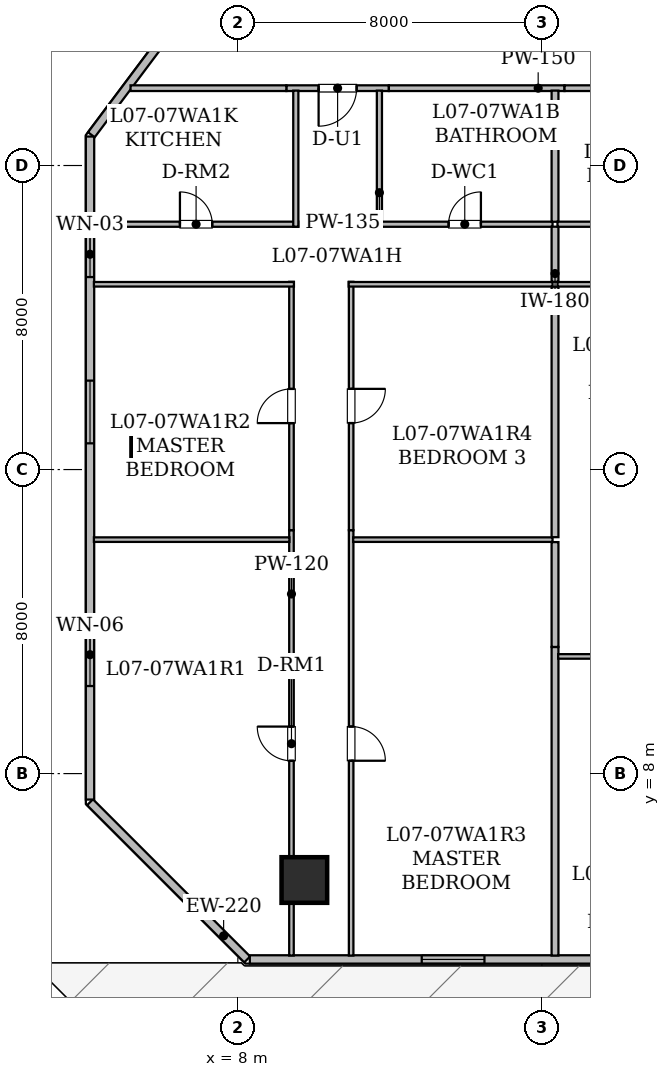
"""IFC4 building model, lengths in metres.
Left out: names, types, materials, properties, quantities, classifications, styles, units other than length and angle.
Written with IfcOpenShell. Run it as: python <this file> out.ifc"""

import sys

from ifc_helpers import new_model, si_unit, direction, frame, frame_2d, origin, origin_2d, place, context, subcontext, project, spatial, rectangle, hollow_rectangle, extrude, element, fill, save


model = new_model("IFC4")
c1 = context("Model", 3, precision=1e-05, world=origin(), true_north=direction((0.0, 1.0)))
c2 = subcontext(c1, "Body", "Model", "MODEL_VIEW")
j1 = project(units=[si_unit("LENGTHUNIT", "METRE"), si_unit("PLANEANGLEUNIT", "RADIAN")], contexts=[c1])
p1 = place(None, origin())
s1 = spatial("IfcSite", under=j1, at=p1, CompositionType="ELEMENT")
p2 = place(p1, origin())
s2 = spatial("IfcBuilding", under=s1, at=p2, CompositionType="ELEMENT")
p3 = place(p2, frame((0.0, 0.0, 33.3)))
s3 = spatial("IfcBuildingStorey", under=s2, at=p3, CompositionType="ELEMENT", Elevation=33.3)
for number, where, z_axis, x_axis in (
    (1, (9.75, 5.2, 0.025), (0.0, 0.0, 1.0), (1.0, 0.0, 0.0)),
    (2, (5.8, 16.775, 0.025), (0.0, 0.0, 1.0), (1.0, 0.0, 0.0)),
):
    element("IfcColumn", number, at=place(p3, frame(where, z_axis=z_axis, x_axis=x_axis)), inside=s3, PredefinedType="COLUMN", context=c2, shape_type="SweptSolid", body=[
        extrude(hollow_rectangle(XDim=1.2, YDim=1.2, WallThickness=0.06, at=origin_2d()), origin(), (0.0, 0.0, 1.0), 3.625),
    ])
p4 = place(p3, frame((8.246, 3.11, 0.0), z_axis=(0.0, 0.0, 1.0), x_axis=(-0.707106781187, 0.707106781187, 0.0)))
e3 = element("IfcWall", 3, at=p4, inside=s3, PredefinedType="STANDARD", context=c2, shape_type="SweptSolid", body=[
    extrude(rectangle(XDim=5.849, YDim=0.22, at=frame_2d((2.925, 0.0))), origin(), (0.0, 0.0, 1.0), 3.43),
])
p5 = place(p3, frame((4.11, 7.317, 0.0), z_axis=(0.0, 0.0, 1.0), x_axis=(0.0, 1.0, 0.0)))
e4 = element("IfcWall", 4, at=p5, inside=s3, PredefinedType="STANDARD", context=c2, shape_type="SweptSolid", body=[
    extrude(rectangle(XDim=17.446, YDim=0.22, at=frame_2d((8.723, 0.0))), origin(), (0.0, 0.0, 1.0), 3.43),
])
p6 = place(p5, frame((13.748, 0.0, 0.8)))
e5 = element("IfcOpeningElement", 5, at=p6, cuts=e4, PredefinedType="OPENING", context=c2, shape_type="SweptSolid", body=[
    extrude(rectangle(XDim=1.2, YDim=1.5, at=frame_2d((0.6, 0.75))), frame((0.0, 0.12, 0.0), z_axis=(0.0, -1.0, 0.0), x_axis=(1.0, 0.0, 0.0)), (0.0, 0.0, 1.0), 0.24),
])
p7 = place(p5, frame((2.987, 0.0, 0.85)))
e6 = element("IfcOpeningElement", 6, at=p7, cuts=e4, PredefinedType="OPENING", context=c2, shape_type="SweptSolid", body=[
    extrude(rectangle(XDim=1.65, YDim=1.55, at=frame_2d((0.825, 0.775))), frame((0.0, 0.12, 0.0), z_axis=(0.0, -1.0, 0.0), x_axis=(1.0, 0.0, 0.0)), (0.0, 0.0, 1.0), 0.24),
])
p8 = place(p5, frame((9.373, 0.0, 0.85)))
e7 = element("IfcOpeningElement", 7, at=p8, cuts=e4, PredefinedType="OPENING", context=c2, shape_type="SweptSolid", body=[
    extrude(rectangle(XDim=1.65, YDim=1.55, at=frame_2d((0.825, 0.775))), frame((0.0, 0.12, 0.0), z_axis=(0.0, -1.0, 0.0), x_axis=(1.0, 0.0, 0.0)), (0.0, 0.0, 1.0), 0.24),
])
p9 = place(p3, frame((4.145, 24.809, 0.0), z_axis=(0.0, 0.0, 1.0), x_axis=(0.599823674734, 0.800132213592, 0.0)))
e8 = element("IfcWall", 8, at=p9, inside=s3, PredefinedType="STANDARD", context=c2, shape_type="SweptSolid", body=[
    extrude(rectangle(XDim=3.988, YDim=0.22, at=frame_2d((1.994, 0.0))), origin(), (0.0, 0.0, 1.0), 3.43),
])
p10 = place(p3, frame((45.683, 3.11, 0.0), z_axis=(0.0, 0.0, 1.0), x_axis=(-1.0, 0.0, 0.0)))
e9 = element("IfcWall", 9, at=p10, inside=s3, PredefinedType="STANDARD", context=c2, shape_type="SweptSolid", body=[
    extrude(rectangle(XDim=37.368, YDim=0.22, at=frame_2d((18.684, 0.0))), origin(), (0.0, 0.0, 1.0), 3.43),
])
p11 = place(p10, frame((5.728, 0.0, 0.0)))
e10 = element("IfcOpeningElement", 10, at=p11, cuts=e9, PredefinedType="OPENING", context=c2, shape_type="SweptSolid", body=[
    extrude(rectangle(XDim=1.0, YDim=2.15, at=frame_2d((0.5, 1.075))), frame((0.0, 0.12, 0.0), z_axis=(0.0, -1.0, 0.0), x_axis=(1.0, 0.0, 0.0)), (0.0, 0.0, 1.0), 0.24),
])
p12 = place(p10, frame((31.194, 0.0, 0.85)))
e11 = element("IfcOpeningElement", 11, at=p12, cuts=e9, PredefinedType="OPENING", context=c2, shape_type="SweptSolid", body=[
    extrude(rectangle(XDim=1.65, YDim=1.55, at=frame_2d((0.825, 0.775))), frame((0.0, 0.12, 0.0), z_axis=(0.0, -1.0, 0.0), x_axis=(1.0, 0.0, 0.0)), (0.0, 0.0, 1.0), 0.24),
])
p13 = place(p10, frame((23.492, 0.0, 0.8)))
e12 = element("IfcOpeningElement", 12, at=p13, cuts=e9, PredefinedType="OPENING", context=c2, shape_type="SweptSolid", body=[
    extrude(rectangle(XDim=1.2, YDim=1.5, at=frame_2d((0.6, 0.75))), frame((0.0, 0.12, 0.0), z_axis=(0.0, -1.0, 0.0), x_axis=(1.0, 0.0, 0.0)), (0.0, 0.0, 1.0), 0.24),
])
p14 = place(p10, frame((26.282, 0.0, 0.85)))
e13 = element("IfcOpeningElement", 13, at=p14, cuts=e9, PredefinedType="OPENING", context=c2, shape_type="SweptSolid", body=[
    extrude(rectangle(XDim=1.65, YDim=1.55, at=frame_2d((0.825, 0.775))), frame((0.0, 0.12, 0.0), z_axis=(0.0, -1.0, 0.0), x_axis=(1.0, 0.0, 0.0)), (0.0, 0.0, 1.0), 0.24),
])
p15 = place(p10, frame((20.253, 0.0, 0.85)))
e14 = element("IfcOpeningElement", 14, at=p15, cuts=e9, PredefinedType="OPENING", context=c2, shape_type="SweptSolid", body=[
    extrude(rectangle(XDim=1.65, YDim=1.55, at=frame_2d((0.825, 0.775))), frame((0.0, 0.12, 0.0), z_axis=(0.0, -1.0, 0.0), x_axis=(1.0, 0.0, 0.0)), (0.0, 0.0, 1.0), 0.24),
])
p16 = place(p10, frame((10.983, 0.0, 0.8)))
e15 = element("IfcOpeningElement", 15, at=p16, cuts=e9, PredefinedType="OPENING", context=c2, shape_type="SweptSolid", body=[
    extrude(rectangle(XDim=1.2, YDim=1.5, at=frame_2d((0.6, 0.75))), frame((0.0, 0.12, 0.0), z_axis=(0.0, -1.0, 0.0), x_axis=(1.0, 0.0, 0.0)), (0.0, 0.0, 1.0), 0.24),
])
p17 = place(p10, frame((14.783, 0.0, 0.85)))
e16 = element("IfcOpeningElement", 16, at=p17, cuts=e9, PredefinedType="OPENING", context=c2, shape_type="SweptSolid", body=[
    extrude(rectangle(XDim=1.65, YDim=1.55, at=frame_2d((0.825, 0.775))), frame((0.0, 0.12, 0.0), z_axis=(0.0, -1.0, 0.0), x_axis=(1.0, 0.0, 0.0)), (0.0, 0.0, 1.0), 0.24),
])
p18 = place(p10, frame((2.228, 0.0, 0.85)))
e17 = element("IfcOpeningElement", 17, at=p18, cuts=e9, PredefinedType="OPENING", context=c2, shape_type="SweptSolid", body=[
    extrude(rectangle(XDim=1.65, YDim=1.55, at=frame_2d((0.825, 0.775))), frame((0.0, 0.12, 0.0), z_axis=(0.0, -1.0, 0.0), x_axis=(1.0, 0.0, 0.0)), (0.0, 0.0, 1.0), 0.24),
])
p19 = place(p10, frame((0.187, 0.0, 0.8)))
e18 = element("IfcOpeningElement", 18, at=p19, cuts=e9, PredefinedType="OPENING", context=c2, shape_type="SweptSolid", body=[
    extrude(rectangle(XDim=1.2, YDim=1.5, at=frame_2d((0.6, 0.75))), frame((0.0, 0.12, 0.0), z_axis=(0.0, -1.0, 0.0), x_axis=(1.0, 0.0, 0.0)), (0.0, 0.0, 1.0), 0.24),
])
p20 = place(p3, frame((11.974, 26.035, 0.0), z_axis=(0.0, 0.0, 1.0), x_axis=(-1.0, 0.0, 0.0)))
e19 = element("IfcWall", 19, at=p20, inside=s3, PredefinedType="STANDARD", context=c2, shape_type="SweptSolid", body=[
    extrude(rectangle(XDim=2.698, YDim=0.15, at=frame_2d((1.349, 0.0))), origin(), (0.0, 0.0, 1.0), 3.43),
])
p21 = place(p20, frame((0.849, 0.0, 0.0)))
e20 = element("IfcOpeningElement", 20, at=p21, cuts=e19, PredefinedType="OPENING", context=c2, shape_type="SweptSolid", body=[
    extrude(rectangle(XDim=1.0, YDim=2.15, at=frame_2d((0.5, 1.075))), frame((0.0, 0.085, 0.0), z_axis=(0.0, -1.0, 0.0), x_axis=(1.0, 0.0, 0.0)), (0.0, 0.0, 1.0), 0.17),
])
p22 = place(p3, frame((16.596, 26.035, 0.0), z_axis=(0.0, 0.0, 1.0), x_axis=(-1.0, 0.0, 0.0)))
e21 = element("IfcWall", 21, at=p22, inside=s3, PredefinedType="STANDARD", context=c2, shape_type="SweptSolid", body=[
    extrude(rectangle(XDim=4.622, YDim=0.15, at=frame_2d((2.311, 0.0))), origin(), (0.0, 0.0, 1.0), 3.43),
])
p23 = place(p3, frame((9.276, 26.035, 0.0), z_axis=(0.0, 0.0, 1.0), x_axis=(-1.0, 0.0, 0.0)))
e22 = element("IfcWall", 22, at=p23, inside=s3, PredefinedType="STANDARD", context=c2, shape_type="SweptSolid", body=[
    extrude(rectangle(XDim=4.1, YDim=0.15, at=frame_2d((2.05, 0.0))), origin(), (0.0, 0.0, 1.0), 2.803),
])
p24 = place(p3, frame((19.777, 26.035, 0.0), z_axis=(0.0, 0.0, 1.0), x_axis=(-1.0, 0.0, 0.0)))
e23 = element("IfcWall", 23, at=p24, inside=s3, PredefinedType="STANDARD", context=c2, shape_type="SweptSolid", body=[
    extrude(rectangle(XDim=3.181, YDim=0.15, at=frame_2d((1.591, 0.0))), origin(), (0.0, 0.0, 1.0), 2.647),
])
p25 = place(p3, frame((11.725, 25.97, 0.0), z_axis=(0.0, 0.0, 1.0), x_axis=(0.0, -1.0, 0.0)))
e24 = element("IfcWall", 24, at=p25, inside=s3, PredefinedType="PARTITIONING", context=c2, shape_type="SweptSolid", body=[
    extrude(rectangle(XDim=3.58, YDim=0.135, at=frame_2d((1.79, 0.0))), origin(), (0.0, 0.0, 1.0), 2.957),
])
p26 = place(p3, frame((11.66, 22.455, 0.0), z_axis=(0.0, 0.0, 1.0), x_axis=(1.0, 0.0, 0.0)))
e25 = element("IfcWall", 25, at=p26, inside=s3, PredefinedType="PARTITIONING", context=c2, shape_type="SweptSolid", body=[
    extrude(rectangle(XDim=4.621, YDim=0.135, at=frame_2d((2.311, 0.0))), origin(), (0.0, 0.0, 1.0), 3.43),
])
p27 = place(p26, frame((1.886, 0.0, 0.0)))
e26 = element("IfcOpeningElement", 26, at=p27, cuts=e25, PredefinedType="OPENING", context=c2, shape_type="SweptSolid", body=[
    extrude(rectangle(XDim=0.85, YDim=2.1, at=frame_2d((0.425, 1.05))), frame((0.0, 0.077, 0.0), z_axis=(0.0, -1.0, 0.0), x_axis=(1.0, 0.0, 0.0)), (0.0, 0.0, 1.0), 0.155),
])
p28 = place(p3, frame((4.212, 22.455, 0.0), z_axis=(0.0, 0.0, 1.0), x_axis=(1.0, 0.0, 0.0)))
e27 = element("IfcWall", 27, at=p28, inside=s3, PredefinedType="PARTITIONING", context=c2, shape_type="SweptSolid", body=[
    extrude(rectangle(XDim=5.378, YDim=0.135, at=frame_2d((2.689, 0.0))), origin(), (0.0, 0.0, 1.0), 2.803),
])
p29 = place(p28, frame((2.264, 0.0, 0.0)))
e28 = element("IfcOpeningElement", 28, at=p29, cuts=e27, PredefinedType="OPENING", context=c2, shape_type="SweptSolid", body=[
    extrude(rectangle(XDim=0.85, YDim=2.1, at=frame_2d((0.425, 1.05))), frame((0.0, 0.077, 0.0), z_axis=(0.0, -1.0, 0.0), x_axis=(1.0, 0.0, 0.0)), (0.0, 0.0, 1.0), 0.155),
])
p30 = place(p3, frame((9.525, 22.39, 0.0), z_axis=(0.0, 0.0, 1.0), x_axis=(0.0, 1.0, 0.0)))
e29 = element("IfcWall", 29, at=p30, inside=s3, PredefinedType="PARTITIONING", context=c2, shape_type="SweptSolid", body=[
    extrude(rectangle(XDim=3.58, YDim=0.135, at=frame_2d((1.79, 0.0))), origin(), (0.0, 0.0, 1.0), 2.957),
])
p31 = place(p3, frame((9.411, 3.212, 0.0), z_axis=(0.0, 0.0, 1.0), x_axis=(0.0, 1.0, 0.0)))
e30 = element("IfcWall", 30, at=p31, inside=s3, PredefinedType="PARTITIONING", context=c2, shape_type="SweptSolid", body=[
    extrude(rectangle(XDim=11.193, YDim=0.12, at=frame_2d((5.597, 0.0))), origin(), (0.0, 0.0, 1.0), 2.647),
])
p32 = place(p31, frame((5.125, 0.0, 0.0)))
e31 = element("IfcOpeningElement", 31, at=p32, cuts=e30, PredefinedType="OPENING", context=c2, shape_type="SweptSolid", body=[
    extrude(rectangle(XDim=0.9, YDim=2.1, at=frame_2d((0.45, 1.05))), frame((0.0, 0.07, 0.0), z_axis=(0.0, -1.0, 0.0), x_axis=(1.0, 0.0, 0.0)), (0.0, 0.0, 1.0), 0.14),
])
p33 = place(p3, frame((9.411, 14.405, 0.0), z_axis=(0.0, 0.0, 1.0), x_axis=(0.0, 1.0, 0.0)))
e32 = element("IfcWall", 32, at=p33, inside=s3, PredefinedType="PARTITIONING", context=c2, shape_type="SweptSolid", body=[
    extrude(rectangle(XDim=6.535, YDim=0.12, at=frame_2d((3.268, 0.0))), origin(), (0.0, 0.0, 1.0), 2.647),
])
p34 = place(p33, frame((2.817, 0.0, 0.0)))
e33 = element("IfcOpeningElement", 33, at=p34, cuts=e32, PredefinedType="OPENING", context=c2, shape_type="SweptSolid", body=[
    extrude(rectangle(XDim=0.9, YDim=2.1, at=frame_2d((0.45, 1.05))), frame((0.0, 0.07, 0.0), z_axis=(0.0, -1.0, 0.0), x_axis=(1.0, 0.0, 0.0)), (0.0, 0.0, 1.0), 0.14),
])
p35 = place(p3, frame((9.476, 20.875, 0.0), z_axis=(0.0, 0.0, 1.0), x_axis=(-1.0, 0.0, 0.0)))
e34 = element("IfcWall", 34, at=p35, inside=s3, PredefinedType="PARTITIONING", context=c2, shape_type="SweptSolid", body=[
    extrude(rectangle(XDim=5.264, YDim=0.12, at=frame_2d((2.632, 0.0))), origin(), (0.0, 0.0, 1.0), 2.803),
])
p36 = place(p3, frame((10.981, 14.405, 0.0), z_axis=(0.0, 0.0, 1.0), x_axis=(0.0, -1.0, 0.0)))
e35 = element("IfcWall", 35, at=p36, inside=s3, PredefinedType="PARTITIONING", context=c2, shape_type="SweptSolid", body=[
    extrude(rectangle(XDim=11.193, YDim=0.12, at=frame_2d((5.597, 0.0))), origin(), (0.0, 0.0, 1.0), 2.647),
])
p37 = place(p36, frame((5.167, 0.0, 0.0)))
e36 = element("IfcOpeningElement", 36, at=p37, cuts=e35, PredefinedType="OPENING", context=c2, shape_type="SweptSolid", body=[
    extrude(rectangle(XDim=0.9, YDim=2.1, at=frame_2d((0.45, 1.05))), frame((0.0, 0.07, 0.0), z_axis=(0.0, -1.0, 0.0), x_axis=(1.0, 0.0, 0.0)), (0.0, 0.0, 1.0), 0.14),
])
p38 = place(p3, frame((10.981, 20.94, 0.0), z_axis=(0.0, 0.0, 1.0), x_axis=(0.0, -1.0, 0.0)))
e37 = element("IfcWall", 37, at=p38, inside=s3, PredefinedType="PARTITIONING", context=c2, shape_type="SweptSolid", body=[
    extrude(rectangle(XDim=6.535, YDim=0.12, at=frame_2d((3.268, 0.0))), origin(), (0.0, 0.0, 1.0), 2.647),
])
p39 = place(p38, frame((2.817, 0.0, 0.0)))
e38 = element("IfcOpeningElement", 38, at=p39, cuts=e37, PredefinedType="OPENING", context=c2, shape_type="SweptSolid", body=[
    extrude(rectangle(XDim=0.9, YDim=2.1, at=frame_2d((0.45, 1.05))), frame((0.0, 0.07, 0.0), z_axis=(0.0, -1.0, 0.0), x_axis=(1.0, 0.0, 0.0)), (0.0, 0.0, 1.0), 0.14),
])
p40 = place(p3, frame((16.281, 20.875, 0.0), z_axis=(0.0, 0.0, 1.0), x_axis=(-1.0, 0.0, 0.0)))
e39 = element("IfcWall", 39, at=p40, inside=s3, PredefinedType="PARTITIONING", context=c2, shape_type="SweptSolid", body=[
    extrude(rectangle(XDim=5.365, YDim=0.12, at=frame_2d((2.683, 0.0))), origin(), (0.0, 0.0, 1.0), 3.43),
])
p41 = place(p3, frame((16.346, 22.39, 0.0), z_axis=(0.0, 0.0, 1.0), x_axis=(0.0, -1.0, 0.0)))
e40 = element("IfcWall", 40, at=p41, inside=s3, PredefinedType="STANDARD", context=c2, shape_type="SweptSolid", body=[
    extrude(rectangle(XDim=1.45, YDim=0.18, at=frame_2d((0.725, 0.0))), origin(), (0.0, 0.0, 1.0), 3.43),
])
p42 = place(p3, frame((16.346, 25.97, 0.0), z_axis=(0.0, 0.0, 1.0), x_axis=(0.0, -1.0, 0.0)))
e41 = element("IfcWall", 41, at=p42, inside=s3, PredefinedType="STANDARD", context=c2, shape_type="SweptSolid", body=[
    extrude(rectangle(XDim=3.45, YDim=0.18, at=frame_2d((1.725, 0.0))), origin(), (0.0, 0.0, 1.0), 2.957),
])
p43 = place(p3, frame((4.212, 14.156, 0.0), z_axis=(0.0, 0.0, 1.0), x_axis=(1.0, 0.0, 0.0)))
e42 = element("IfcWall", 42, at=p43, inside=s3, PredefinedType="PARTITIONING", context=c2, shape_type="SweptSolid", body=[
    extrude(rectangle(XDim=5.145, YDim=0.12, at=frame_2d((2.573, 0.0))), origin(), (0.0, 0.0, 1.0), 2.803),
])
p44 = place(p3, frame((11.035, 14.156, 0.0), z_axis=(0.0, 0.0, 1.0), x_axis=(1.0, 0.0, 0.0)))
e43 = element("IfcWall", 43, at=p44, inside=s3, PredefinedType="PARTITIONING", context=c2, shape_type="SweptSolid", body=[
    extrude(rectangle(XDim=5.246, YDim=0.12, at=frame_2d((2.623, 0.0))), origin(), (0.0, 0.0, 1.0), 2.647),
])
p45 = place(p3, frame((16.346, 11.332, 0.0), z_axis=(0.0, 0.0, 1.0), x_axis=(0.0, -1.0, 0.0)))
e44 = element("IfcWall", 44, at=p45, inside=s3, PredefinedType="STANDARD", context=c2, shape_type="SweptSolid", body=[
    extrude(rectangle(XDim=8.12, YDim=0.18, at=frame_2d((4.06, 0.0))), origin(), (0.0, 0.0, 1.0), 2.803),
])
p46 = place(p3, frame((16.346, 14.091, 0.0), z_axis=(0.0, 0.0, 1.0), x_axis=(0.0, -1.0, 0.0)))
e45 = element("IfcWall", 45, at=p46, inside=s3, PredefinedType="STANDARD", context=c2, shape_type="SweptSolid", body=[
    extrude(rectangle(XDim=2.759, YDim=0.18, at=frame_2d((1.379, 0.0))), origin(), (0.0, 0.0, 1.0), 3.43),
])
p47 = place(p3, frame((16.346, 20.81, 0.0), z_axis=(0.0, 0.0, 1.0), x_axis=(0.0, -1.0, 0.0)))
e46 = element("IfcWall", 46, at=p47, inside=s3, PredefinedType="STANDARD", context=c2, shape_type="SweptSolid", body=[
    extrude(rectangle(XDim=6.589, YDim=0.18, at=frame_2d((3.294, 0.0))), origin(), (0.0, 0.0, 1.0), 2.647),
])
p48 = place(p3, frame((16.411, 22.455, 0.0), z_axis=(0.0, 0.0, 1.0), x_axis=(1.0, 0.0, 0.0)))
e47 = element("IfcWall", 47, at=p48, inside=s3, PredefinedType="PARTITIONING", context=c2, shape_type="SweptSolid", body=[
    extrude(rectangle(XDim=3.68, YDim=0.135, at=frame_2d((1.84, 0.0))), origin(), (0.0, 0.0, 1.0), 2.647),
])
p49 = place(p48, frame((1.415, 0.0, 0.0)))
e48 = element("IfcOpeningElement", 48, at=p49, cuts=e47, PredefinedType="OPENING", context=c2, shape_type="SweptSolid", body=[
    extrude(rectangle(XDim=0.85, YDim=2.1, at=frame_2d((0.425, 1.05))), frame((0.0, 0.077, 0.0), z_axis=(0.0, -1.0, 0.0), x_axis=(1.0, 0.0, 0.0)), (0.0, 0.0, 1.0), 0.155),
])
p50 = place(p3, frame((20.871, 20.875, 0.0), z_axis=(0.0, 0.0, 1.0), x_axis=(-1.0, 0.0, 0.0)))
e49 = element("IfcWall", 49, at=p50, inside=s3, PredefinedType="PARTITIONING", context=c2, shape_type="SweptSolid", body=[
    extrude(rectangle(XDim=4.46, YDim=0.12, at=frame_2d((2.23, 0.0))), origin(), (0.0, 0.0, 1.0), 2.647),
])
p51 = place(p3, frame((16.428, 11.083, 0.0), z_axis=(0.0, 0.0, 1.0), x_axis=(1.0, 0.0, 0.0)))
e50 = element("IfcWall", 50, at=p51, inside=s3, PredefinedType="PARTITIONING", context=c2, shape_type="SweptSolid", body=[
    extrude(rectangle(XDim=4.324, YDim=0.12, at=frame_2d((2.162, 0.0))), origin(), (0.0, 0.0, 1.0), 2.647),
])
p52 = place(p6, origin())
e51 = element("IfcWindow", 51, at=p52, inside=s3, PartitioningType="SINGLE_PANEL", PredefinedType="WINDOW", context=c2, shape_type="SweptSolid", body=[
    extrude(rectangle(XDim=1.2, YDim=1.5, at=frame_2d((0.6, 0.75))), frame((0.0, 0.03, 0.0), z_axis=(0.0, -1.0, 0.0), x_axis=(1.0, 0.0, 0.0)), (0.0, 0.0, 1.0), 0.06),
])
fill(e5, e51)
p53 = place(p7, origin())
e52 = element("IfcWindow", 52, at=p53, inside=s3, PartitioningType="SINGLE_PANEL", PredefinedType="WINDOW", context=c2, shape_type="SweptSolid", body=[
    extrude(rectangle(XDim=1.65, YDim=1.55, at=frame_2d((0.825, 0.775))), frame((0.0, 0.03, 0.0), z_axis=(0.0, -1.0, 0.0), x_axis=(1.0, 0.0, 0.0)), (0.0, 0.0, 1.0), 0.06),
])
fill(e6, e52)
p54 = place(p8, origin())
e53 = element("IfcWindow", 53, at=p54, inside=s3, PartitioningType="SINGLE_PANEL", PredefinedType="WINDOW", context=c2, shape_type="SweptSolid", body=[
    extrude(rectangle(XDim=1.65, YDim=1.55, at=frame_2d((0.825, 0.775))), frame((0.0, 0.03, 0.0), z_axis=(0.0, -1.0, 0.0), x_axis=(1.0, 0.0, 0.0)), (0.0, 0.0, 1.0), 0.06),
])
fill(e7, e53)
p55 = place(p12, origin())
e54 = element("IfcWindow", 54, at=p55, inside=s3, PartitioningType="SINGLE_PANEL", PredefinedType="WINDOW", context=c2, shape_type="SweptSolid", body=[
    extrude(rectangle(XDim=1.65, YDim=1.55, at=frame_2d((0.825, 0.775))), frame((0.0, 0.03, 0.0), z_axis=(0.0, -1.0, 0.0), x_axis=(1.0, 0.0, 0.0)), (0.0, 0.0, 1.0), 0.06),
])
fill(e11, e54)
p56 = place(p21, origin())
e55 = element("IfcDoor", 55, at=p56, inside=s3, OperationType="SINGLE_SWING_RIGHT", PredefinedType="DOOR", context=c2, shape_type="SweptSolid", body=[
    extrude(rectangle(XDim=1.0, YDim=2.15, at=frame_2d((0.5, 1.075))), frame((0.0, 0.025, 0.0), z_axis=(0.0, -1.0, 0.0), x_axis=(1.0, 0.0, 0.0)), (0.0, 0.0, 1.0), 0.05),
])
fill(e20, e55)
p57 = place(p27, origin())
e56 = element("IfcDoor", 56, at=p57, inside=s3, OperationType="SINGLE_SWING_RIGHT", PredefinedType="DOOR", context=c2, shape_type="SweptSolid", body=[
    extrude(rectangle(XDim=0.85, YDim=2.1, at=frame_2d((0.425, 1.05))), frame((0.0, 0.025, 0.0), z_axis=(0.0, -1.0, 0.0), x_axis=(1.0, 0.0, 0.0)), (0.0, 0.0, 1.0), 0.05),
])
fill(e26, e56)
p58 = place(p29, origin())
e57 = element("IfcDoor", 57, at=p58, inside=s3, OperationType="SINGLE_SWING_LEFT", PredefinedType="DOOR", context=c2, shape_type="SweptSolid", body=[
    extrude(rectangle(XDim=0.85, YDim=2.1, at=frame_2d((0.425, 1.05))), frame((0.0, 0.025, 0.0), z_axis=(0.0, -1.0, 0.0), x_axis=(1.0, 0.0, 0.0)), (0.0, 0.0, 1.0), 0.05),
])
fill(e28, e57)
p59 = place(p32, origin())
e58 = element("IfcDoor", 58, at=p59, inside=s3, OperationType="SINGLE_SWING_RIGHT", PredefinedType="DOOR", context=c2, shape_type="SweptSolid", body=[
    extrude(rectangle(XDim=0.9, YDim=2.1, at=frame_2d((0.45, 1.05))), frame((0.0, 0.025, 0.0), z_axis=(0.0, -1.0, 0.0), x_axis=(1.0, 0.0, 0.0)), (0.0, 0.0, 1.0), 0.05),
])
fill(e31, e58)
p60 = place(p34, origin())
e59 = element("IfcDoor", 59, at=p60, inside=s3, OperationType="SINGLE_SWING_LEFT", PredefinedType="DOOR", context=c2, shape_type="SweptSolid", body=[
    extrude(rectangle(XDim=0.9, YDim=2.1, at=frame_2d((0.45, 1.05))), frame((0.0, 0.025, 0.0), z_axis=(0.0, -1.0, 0.0), x_axis=(1.0, 0.0, 0.0)), (0.0, 0.0, 1.0), 0.05),
])
fill(e33, e59)
p61 = place(p37, origin())
e60 = element("IfcDoor", 60, at=p61, inside=s3, OperationType="SINGLE_SWING_RIGHT", PredefinedType="DOOR", context=c2, shape_type="SweptSolid", body=[
    extrude(rectangle(XDim=0.9, YDim=2.1, at=frame_2d((0.45, 1.05))), frame((0.0, 0.025, 0.0), z_axis=(0.0, -1.0, 0.0), x_axis=(1.0, 0.0, 0.0)), (0.0, 0.0, 1.0), 0.05),
])
fill(e36, e60)
p62 = place(p39, origin())
e61 = element("IfcDoor", 61, at=p62, inside=s3, OperationType="SINGLE_SWING_LEFT", PredefinedType="DOOR", context=c2, shape_type="SweptSolid", body=[
    extrude(rectangle(XDim=0.9, YDim=2.1, at=frame_2d((0.45, 1.05))), frame((0.0, 0.025, 0.0), z_axis=(0.0, -1.0, 0.0), x_axis=(1.0, 0.0, 0.0)), (0.0, 0.0, 1.0), 0.05),
])
fill(e38, e61)
save(model, sys.argv[1])
